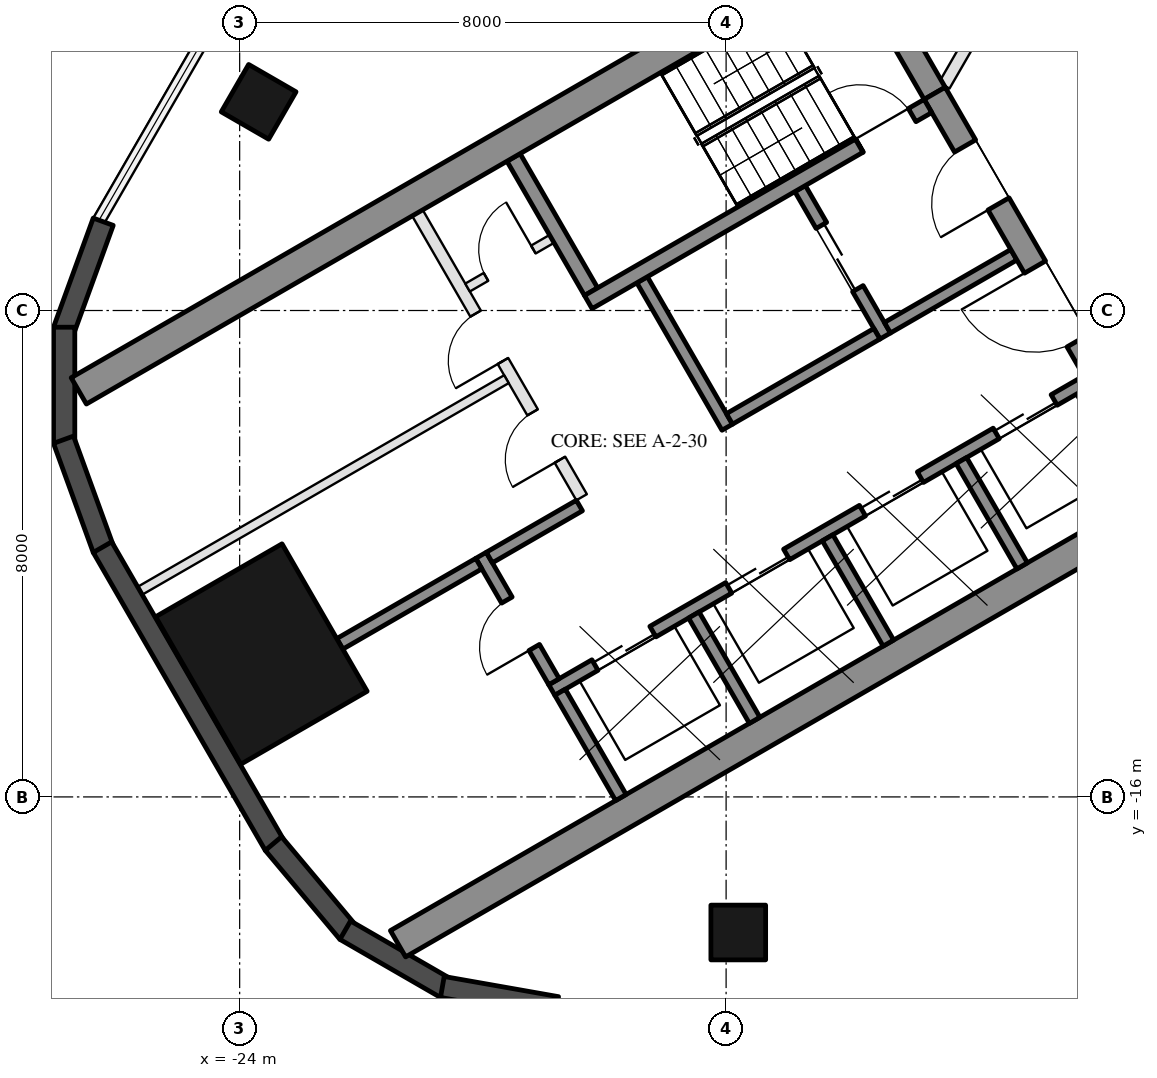
"""IFC4 building model, lengths in metres.
Left out: names, types, materials, properties, quantities, classifications, styles, units other than length and angle.
Written with IfcOpenShell. Run it as: python <this file> out.ifc"""

import sys

from ifc_helpers import new_model, si_unit, direction, frame, frame_2d, origin, origin_2d, place, context, subcontext, project, spatial, rectangle, hollow_rectangle, extrude, element, fill, save


model = new_model("IFC4")
c1 = context("Model", 3, precision=1e-05, world=origin(), true_north=direction((0.0, 1.0)))
c2 = subcontext(c1, "Body", "Model", "MODEL_VIEW")
j1 = project(units=[si_unit("LENGTHUNIT", "METRE"), si_unit("PLANEANGLEUNIT", "RADIAN")], contexts=[c1])
p1 = place(None, origin())
s1 = spatial("IfcSite", under=j1, at=p1, CompositionType="ELEMENT")
p2 = place(p1, origin())
s2 = spatial("IfcBuilding", under=s1, at=p2, CompositionType="ELEMENT")
p3 = place(p2, frame((0.0, 0.0, 131.6)))
s3 = spatial("IfcBuildingStorey", under=s2, at=p3, CompositionType="ELEMENT", Elevation=131.6)
for number, where, z_axis, x_axis in (
    (1, (-15.8, -18.23, 0.0), (0.0, 0.0, 1.0), (-1.0, 0.0, 0.0)),
    (2, (-23.688, -4.568, 0.0), (0.0, 0.0, 1.0), (0.5, 0.866, 0.0)),
):
    element("IfcColumn", number, at=place(p3, frame(where, z_axis=z_axis, x_axis=x_axis)), inside=s3, PredefinedType="COLUMN", context=c2, shape_type="SweptSolid", body=[
        extrude(hollow_rectangle(XDim=0.9, YDim=0.9, WallThickness=0.04, at=origin_2d()), origin(), (0.0, 0.0, 1.0), 6.0),
    ])
p4 = place(p3, frame((-23.643, -13.65, 0.0), z_axis=(0.0, 0.0, 1.0), x_axis=(-0.5, 0.866025403784, 0.0)))
e3 = element("IfcColumn", 3, at=p4, inside=s3, PredefinedType="COLUMN", context=c2, shape_type="SweptSolid", body=[
    extrude(hollow_rectangle(XDim=2.8, YDim=2.4, WallThickness=0.07, at=origin_2d()), origin(), (0.0, 0.0, 1.0), 6.0),
])
for number, where, z_axis, x_axis in (
    (4, (-26.244, -6.54, 0.0), (0.0, 0.0, 1.0), (-0.342, -0.94, 0.0)),
    (5, (-26.886, -8.275, 0.0), (0.0, 0.0, 1.0), (0.0, -1.0, 0.0)),
    (6, (-26.897, -10.125, 0.0), (0.0, 0.0, 1.0), (0.342, -0.94, 0.0)),
):
    element("IfcWall", number, at=place(p3, frame(where, z_axis=z_axis, x_axis=x_axis)), inside=s3, PredefinedType="SOLIDWALL", context=c2, shape_type="SweptSolid", body=[
        extrude(rectangle(XDim=1.91, YDim=0.35, at=frame_2d((0.955, 0.0))), origin(), (0.0, 0.0, 1.0), 5.7),
    ])
p5 = place(p3, frame((-26.256, -11.893, 0.0), z_axis=(0.0, 0.0, 1.0), x_axis=(0.499986410639, -0.866033249463, 0.0)))
e7 = element("IfcWall", 7, at=p5, inside=s3, PredefinedType="SOLIDWALL", context=c2, shape_type="SweptSolid", body=[
    extrude(rectangle(XDim=5.658, YDim=0.35, at=frame_2d((2.829, 0.0))), origin(), (0.0, 0.0, 1.0), 5.7),
])
for number, where, z_axis, x_axis in (
    (8, (-23.445, -16.768, 0.0), (0.0, 0.0, 1.0), (0.643, -0.766, 0.0)),
    (9, (-22.264, -18.192, 0.0), (0.0, 0.0, 1.0), (0.866, -0.5, 0.0)),
):
    element("IfcWall", number, at=place(p3, frame(where, z_axis=z_axis, x_axis=x_axis)), inside=s3, PredefinedType="SOLIDWALL", context=c2, shape_type="SweptSolid", body=[
        extrude(rectangle(XDim=1.91, YDim=0.35, at=frame_2d((0.955, 0.0))), origin(), (0.0, 0.0, 1.0), 5.7),
    ])
p6 = place(p3, frame((-20.667, -19.126, 0.0), z_axis=(0.0, 0.0, 1.0), x_axis=(0.984798995425, -0.173697837091, 0.0)))
e10 = element("IfcWall", 10, at=p6, inside=s3, PredefinedType="SOLIDWALL", context=c2, shape_type="SweptSolid", body=[
    extrude(rectangle(XDim=1.91, YDim=0.35, at=frame_2d((0.955, 0.0))), origin(), (0.0, 0.0, 1.0), 5.7),
])
p7 = place(p3, frame((-8.547, -10.997, 0.0), z_axis=(0.0, 0.0, 1.0), x_axis=(-0.866025009528, -0.500000682871, 0.0)))
e11 = element("IfcWall", 11, at=p7, inside=s3, PredefinedType="SHEAR", context=c2, shape_type="SweptSolid", body=[
    extrude(rectangle(XDim=14.837, YDim=0.5, at=frame_2d((7.418, 0.0))), origin(), (0.0, 0.0, 1.0), 5.7),
])
p8 = place(p3, frame((-19.496, -5.482, 0.0), z_axis=(0.0, 0.0, 1.0), x_axis=(0.499990435942, -0.866030925526, 0.0)))
e12 = element("IfcWall", 12, at=p8, inside=s3, PredefinedType="SHEAR", context=c2, shape_type="SweptSolid", body=[
    extrude(rectangle(XDim=2.55, YDim=0.25, at=frame_2d((1.275, 0.0))), origin(), (0.0, 0.0, 1.0), 5.7),
])
p9 = place(p3, frame((-17.381, -7.495, 0.0), z_axis=(0.0, 0.0, 1.0), x_axis=(0.500011755427, -0.866018616679, 0.0)))
e13 = element("IfcWall", 13, at=p9, inside=s3, PredefinedType="SHEAR", context=c2, shape_type="SweptSolid", body=[
    extrude(rectangle(XDim=2.8, YDim=0.2, at=frame_2d((1.4, 0.0))), origin(), (0.0, 0.0, 1.0), 5.7),
])
p10 = place(p3, frame((-14.783, -5.995, 0.0), z_axis=(0.0, 0.0, 1.0), x_axis=(0.49994636267, -0.866056369097, 0.0)))
e14 = element("IfcWall", 14, at=p10, inside=s3, PredefinedType="SHEAR", context=c2, shape_type="SweptSolid", body=[
    extrude(rectangle(XDim=2.8, YDim=0.2, at=frame_2d((1.4, 0.0))), origin(), (0.0, 0.0, 1.0), 5.7),
])
p11 = place(p10, frame((0.7, 0.0, 0.0)))
e15 = element("IfcOpeningElement", 15, at=p11, cuts=e14, PredefinedType="OPENING", context=c2, shape_type="SweptSolid", body=[
    extrude(rectangle(XDim=1.2, YDim=2.1, at=frame_2d((0.6, 1.05))), frame((0.0, 0.11, 0.0), z_axis=(0.0, -1.0, 0.0), x_axis=(1.0, 0.0, 0.0)), (0.0, 0.0, 1.0), 0.22),
])
p12 = place(p3, frame((-13.52, -8.383, 0.0), z_axis=(0.0, 0.0, 1.0), x_axis=(-0.866034573852, -0.49998411664, 0.0)))
e16 = element("IfcWall", 16, at=p12, inside=s3, PredefinedType="SHEAR", context=c2, shape_type="SweptSolid", body=[
    extrude(rectangle(XDim=2.8, YDim=0.2, at=frame_2d((1.4, 0.0))), origin(), (0.0, 0.0, 1.0), 5.7),
])
p13 = place(p3, frame((-11.268, -7.083, 0.0), z_axis=(0.0, 0.0, 1.0), x_axis=(-0.866050077142, -0.499957262057, 0.0)))
e17 = element("IfcWall", 17, at=p13, inside=s3, PredefinedType="SHEAR", context=c2, shape_type="SweptSolid", body=[
    extrude(rectangle(XDim=2.4, YDim=0.2, at=frame_2d((1.2, 0.0))), origin(), (0.0, 0.0, 1.0), 5.7),
])
p14 = place(p3, frame((-10.068, -9.162, 0.0), z_axis=(0.0, 0.0, 1.0), x_axis=(-0.866032725843, -0.499987317609, 0.0)))
e18 = element("IfcWall", 18, at=p14, inside=s3, PredefinedType="SHEAR", context=c2, shape_type="SweptSolid", body=[
    extrude(rectangle(XDim=10.16, YDim=0.2, at=frame_2d((5.08, 0.0))), origin(), (0.0, 0.0, 1.0), 5.7),
])
p15 = place(p14, frame((0.62, 0.0, 0.0)))
e19 = element("IfcOpeningElement", 19, at=p15, cuts=e18, PredefinedType="OPENING", context=c2, shape_type="SweptSolid", body=[
    extrude(rectangle(XDim=1.1, YDim=2.1, at=frame_2d((0.55, 1.05))), frame((0.0, 0.11, 0.0), z_axis=(0.0, -1.0, 0.0), x_axis=(1.0, 0.0, 0.0)), (0.0, 0.0, 1.0), 0.22),
])
p16 = place(p14, frame((3.16, 0.0, 0.0)))
e20 = element("IfcOpeningElement", 20, at=p16, cuts=e18, PredefinedType="OPENING", context=c2, shape_type="SweptSolid", body=[
    extrude(rectangle(XDim=1.1, YDim=2.1, at=frame_2d((0.55, 1.05))), frame((0.0, 0.11, 0.0), z_axis=(0.0, -1.0, 0.0), x_axis=(1.0, 0.0, 0.0)), (0.0, 0.0, 1.0), 0.22),
])
p17 = place(p14, frame((5.7, 0.0, 0.0)))
e21 = element("IfcOpeningElement", 21, at=p17, cuts=e18, PredefinedType="OPENING", context=c2, shape_type="SweptSolid", body=[
    extrude(rectangle(XDim=1.1, YDim=2.1, at=frame_2d((0.55, 1.05))), frame((0.0, 0.11, 0.0), z_axis=(0.0, -1.0, 0.0), x_axis=(1.0, 0.0, 0.0)), (0.0, 0.0, 1.0), 0.22),
])
p18 = place(p14, frame((8.24, 0.0, 0.0)))
e22 = element("IfcOpeningElement", 22, at=p18, cuts=e18, PredefinedType="OPENING", context=c2, shape_type="SweptSolid", body=[
    extrude(rectangle(XDim=1.1, YDim=2.1, at=frame_2d((0.55, 1.05))), frame((0.0, 0.11, 0.0), z_axis=(0.0, -1.0, 0.0), x_axis=(1.0, 0.0, 0.0)), (0.0, 0.0, 1.0), 0.22),
])
p19 = place(p3, frame((-20.031, -12.026, 0.0), z_axis=(0.0, 0.0, 1.0), x_axis=(0.500033551112, -0.866006032174, 0.0)))
e23 = element("IfcWall", 23, at=p19, inside=s3, PredefinedType="SHEAR", context=c2, shape_type="SweptSolid", body=[
    extrude(rectangle(XDim=2.4, YDim=0.2, at=frame_2d((1.2, 0.0))), origin(), (0.0, 0.0, 1.0), 5.7),
])
p20 = place(p19, frame((0.85, 0.0, 0.0)))
e24 = element("IfcOpeningElement", 24, at=p20, cuts=e23, PredefinedType="OPENING", context=c2, shape_type="SweptSolid", body=[
    extrude(rectangle(XDim=0.9, YDim=2.1, at=frame_2d((0.45, 1.05))), frame((0.0, 0.11, 0.0), z_axis=(0.0, -1.0, 0.0), x_axis=(1.0, 0.0, 0.0)), (0.0, 0.0, 1.0), 0.22),
])
p21 = place(p3, frame((-18.413, -11.208, 0.0), z_axis=(0.0, 0.0, 1.0), x_axis=(-0.866038183914, -0.499977863513, 0.0)))
e25 = element("IfcWall", 25, at=p21, inside=s3, PredefinedType="SHEAR", context=c2, shape_type="SweptSolid", body=[
    extrude(rectangle(XDim=1.71, YDim=0.2, at=frame_2d((0.855, 0.0))), origin(), (0.0, 0.0, 1.0), 5.7),
])
for number, where, z_axis, x_axis in (
    (26, (-12.131, -10.468, 0.0), (0.0, 0.0, 1.0), (0.5, -0.866, 0.0)),
    (27, (-14.331, -11.738, 0.0), (0.0, 0.0, 1.0), (0.5, -0.866, 0.0)),
    (28, (-16.531, -13.008, 0.0), (0.0, 0.0, 1.0), (0.5, -0.866, 0.0)),
    (29, (-18.73, -14.278, 0.0), (0.0, 0.0, 1.0), (0.5, -0.866, 0.0)),
):
    element("IfcWall", number, at=place(p3, frame(where, z_axis=z_axis, x_axis=x_axis)), inside=s3, PredefinedType="SHEAR", context=c2, shape_type="SweptSolid", body=[
        extrude(rectangle(XDim=2.0, YDim=0.2, at=frame_2d((1.0, 0.0))), origin(), (0.0, 0.0, 1.0), 5.7),
    ])
p22 = place(p3, frame((-20.067, -12.163, 0.0), z_axis=(0.0, 0.0, 1.0), x_axis=(-0.866060851709, -0.499938597367, 0.0)))
e30 = element("IfcWall", 30, at=p22, inside=s3, PredefinedType="SHEAR", context=c2, shape_type="SweptSolid", body=[
    extrude(rectangle(XDim=2.64, YDim=0.2, at=frame_2d((1.32, 0.0))), origin(), (0.0, 0.0, 1.0), 5.7),
])
p23 = place(p3, frame((-21.076, -6.395, 0.0), z_axis=(0.0, 0.0, 1.0), x_axis=(0.50001468107, -0.866016927499, 0.0)))
e31 = element("IfcWall", 31, at=p23, inside=s3, PredefinedType="PARTITIONING", context=c2, shape_type="SweptSolid", body=[
    extrude(rectangle(XDim=5.4, YDim=0.2, at=frame_2d((2.7, 0.0))), origin(), (0.0, 0.0, 1.0), 5.7),
])
p24 = place(p23, frame((1.913, 0.0, 0.0)))
e32 = element("IfcOpeningElement", 32, at=p24, cuts=e31, PredefinedType="OPENING", context=c2, shape_type="SweptSolid", body=[
    extrude(rectangle(XDim=0.9, YDim=2.1, at=frame_2d((0.45, 1.05))), frame((0.0, 0.11, 0.0), z_axis=(0.0, -1.0, 0.0), x_axis=(1.0, 0.0, 0.0)), (0.0, 0.0, 1.0), 0.22),
])
p25 = place(p23, frame((3.788, 0.0, 0.0)))
e33 = element("IfcOpeningElement", 33, at=p25, cuts=e31, PredefinedType="OPENING", context=c2, shape_type="SweptSolid", body=[
    extrude(rectangle(XDim=0.9, YDim=2.1, at=frame_2d((0.45, 1.05))), frame((0.0, 0.11, 0.0), z_axis=(0.0, -1.0, 0.0), x_axis=(1.0, 0.0, 0.0)), (0.0, 0.0, 1.0), 0.22),
])
p26 = place(p3, frame((-18.866, -6.822, 0.0), z_axis=(0.0, 0.0, 1.0), x_axis=(-0.866028054938, -0.499995408039, 0.0)))
e34 = element("IfcWall", 34, at=p26, inside=s3, PredefinedType="PARTITIONING", context=c2, shape_type="SweptSolid", body=[
    extrude(rectangle(XDim=1.6, YDim=0.15, at=frame_2d((0.8, 0.0))), origin(), (0.0, 0.0, 1.0), 5.7),
])
p27 = place(p26, frame((0.35, 0.0, 0.0)))
e35 = element("IfcOpeningElement", 35, at=p27, cuts=e34, PredefinedType="OPENING", context=c2, shape_type="SweptSolid", body=[
    extrude(rectangle(XDim=0.9, YDim=2.1, at=frame_2d((0.45, 1.05))), frame((0.0, 0.085, 0.0), z_axis=(0.0, -1.0, 0.0), x_axis=(1.0, 0.0, 0.0)), (0.0, 0.0, 1.0), 0.17),
])
p28 = place(p3, frame((-19.613, -9.13, 0.0), z_axis=(0.0, 0.0, 1.0), x_axis=(-0.866031734426, -0.499989034847, 0.0)))
e36 = element("IfcWall", 36, at=p28, inside=s3, PredefinedType="PARTITIONING", context=c2, shape_type="SweptSolid", body=[
    extrude(rectangle(XDim=6.95, YDim=0.15, at=frame_2d((3.475, 0.0))), origin(), (0.0, 0.0, 1.0), 5.7),
])
p29 = place(p3, frame((-15.274, -2.756, 0.0), z_axis=(0.0, 0.0, 1.0), x_axis=(-0.86602396135, -0.500002498361, 0.0)))
e37 = element("IfcWall", 37, at=p29, inside=s3, PredefinedType="SHEAR", context=c2, shape_type="SweptSolid", body=[
    extrude(rectangle(XDim=13.131, YDim=0.5, at=frame_2d((6.565, 0.0))), origin(), (0.0, 0.0, 1.0), 5.7),
])
p30 = place(p3, frame((-13.845, -2.22, 0.0), z_axis=(0.0, 0.0, 1.0), x_axis=(0.500062241894, -0.865989465428, 0.0)))
e38 = element("IfcWall", 38, at=p30, inside=s3, PredefinedType="SHEAR", context=c2, shape_type="SweptSolid", body=[
    extrude(rectangle(XDim=2.55, YDim=0.4, at=frame_2d((1.275, 0.0))), origin(), (0.0, 0.0, 1.0), 5.7),
])
p31 = place(p3, frame((-12.57, -4.428, 0.0), z_axis=(0.0, 0.0, 1.0), x_axis=(0.499984378957, -0.86603442241, 0.0)))
e39 = element("IfcWall", 39, at=p31, inside=s3, PredefinedType="SHEAR", context=c2, shape_type="SweptSolid", body=[
    extrude(rectangle(XDim=7.45, YDim=0.4, at=frame_2d((3.725, 0.0))), origin(), (0.0, 0.0, 1.0), 5.7),
])
p32 = place(p31, frame((1.0, 0.0, 0.0)))
e40 = element("IfcOpeningElement", 40, at=p32, cuts=e39, PredefinedType="OPENING", context=c2, shape_type="SweptSolid", body=[
    extrude(rectangle(XDim=1.1, YDim=2.1, at=frame_2d((0.55, 1.05))), frame((0.0, 0.21, 0.0), z_axis=(0.0, -1.0, 0.0), x_axis=(1.0, 0.0, 0.0)), (0.0, 0.0, 1.0), 0.42),
])
p33 = place(p31, frame((3.3, 0.0, 0.0)))
e41 = element("IfcOpeningElement", 41, at=p33, cuts=e39, PredefinedType="OPENING", context=c2, shape_type="SweptSolid", body=[
    extrude(rectangle(XDim=1.4, YDim=2.1, at=frame_2d((0.7, 1.05))), frame((0.0, 0.21, 0.0), z_axis=(0.0, -1.0, 0.0), x_axis=(1.0, 0.0, 0.0)), (0.0, 0.0, 1.0), 0.42),
])
p34 = place(p3, frame((-12.681, -4.636, 0.0), z_axis=(0.0, 0.0, 1.0), x_axis=(-0.86601437931, -0.500019094464, 0.0)))
e42 = element("IfcWall", 42, at=p34, inside=s3, PredefinedType="SHEAR", context=c2, shape_type="SweptSolid", body=[
    extrude(rectangle(XDim=1.306, YDim=0.25, at=frame_2d((0.653, 0.0))), origin(), (0.0, 0.0, 1.0), 5.7),
])
p35 = place(p34, frame((0.3, 0.0, 0.0)))
e43 = element("IfcOpeningElement", 43, at=p35, cuts=e42, PredefinedType="OPENING", context=c2, shape_type="SweptSolid", body=[
    extrude(rectangle(XDim=1.0, YDim=2.1, at=frame_2d((0.5, 1.05))), frame((0.0, 0.135, 0.0), z_axis=(0.0, -1.0, 0.0), x_axis=(1.0, 0.0, 0.0)), (0.0, 0.0, 1.0), 0.27),
])
p36 = place(p3, frame((-13.812, -5.29, 0.0), z_axis=(0.0, 0.0, 1.0), x_axis=(-0.866023561601, -0.500003190742, 0.0)))
e44 = element("IfcWall", 44, at=p36, inside=s3, PredefinedType="SHEAR", context=c2, shape_type="SweptSolid", body=[
    extrude(rectangle(XDim=5.144, YDim=0.25, at=frame_2d((2.572, 0.0))), origin(), (0.0, 0.0, 1.0), 5.7),
])
p37 = place(p3, frame((-2.482, 12.9, 0.0), z_axis=(0.0, 0.0, 1.0), x_axis=(-0.50000478328, -0.866022642139, 0.0)))
e45 = element("IfcWall", 45, at=p37, inside=s3, PredefinedType="PARTITIONING", context=c2, shape_type="SweptSolid", body=[
    extrude(rectangle(XDim=19.861, YDim=0.2, at=frame_2d((9.931, 0.0))), origin(), (0.0, 0.0, 1.0), 4.91),
])
p38 = place(p37, frame((2.643, 0.0, 0.0)))
e46 = element("IfcOpeningElement", 46, at=p38, cuts=e45, PredefinedType="OPENING", context=c2, shape_type="SweptSolid", body=[
    extrude(rectangle(XDim=1.5, YDim=2.1, at=frame_2d((0.75, 1.05))), frame((0.0, 0.11, 0.0), z_axis=(0.0, -1.0, 0.0), x_axis=(1.0, 0.0, 0.0)), (0.0, 0.0, 1.0), 0.22),
])
p39 = place(p37, frame((14.261, 0.0, 0.0)))
e47 = element("IfcOpeningElement", 47, at=p39, cuts=e45, PredefinedType="OPENING", context=c2, shape_type="SweptSolid", body=[
    extrude(rectangle(XDim=1.5, YDim=2.1, at=frame_2d((0.75, 1.05))), frame((0.0, 0.11, 0.0), z_axis=(0.0, -1.0, 0.0), x_axis=(1.0, 0.0, 0.0)), (0.0, 0.0, 1.0), 0.22),
])
p40 = place(p37, frame((17.394, 0.0, 0.0)))
e48 = element("IfcOpeningElement", 48, at=p40, cuts=e45, PredefinedType="OPENING", context=c2, shape_type="SweptSolid", body=[
    extrude(rectangle(XDim=1.5, YDim=2.1, at=frame_2d((0.75, 1.05))), frame((0.0, 0.11, 0.0), z_axis=(0.0, -1.0, 0.0), x_axis=(1.0, 0.0, 0.0)), (0.0, 0.0, 1.0), 0.22),
])
p41 = place(p37, frame((9.43, 0.0, 0.0)))
e49 = element("IfcOpeningElement", 49, at=p41, cuts=e45, PredefinedType="OPENING", context=c2, shape_type="SweptSolid", body=[
    extrude(rectangle(XDim=1.0, YDim=2.1, at=frame_2d((0.5, 1.05))), frame((0.0, 0.11, 0.0), z_axis=(0.0, -1.0, 0.0), x_axis=(1.0, 0.0, 0.0)), (0.0, 0.0, 1.0), 0.22),
])
p42 = place(p11, origin())
e50 = element("IfcDoor", 50, at=p42, inside=s3, OperationType="DOUBLE_DOOR_SLIDING", PredefinedType="DOOR", context=c2, shape_type="SweptSolid", body=[
    extrude(rectangle(XDim=1.2, YDim=2.1, at=frame_2d((0.6, 1.05))), frame((0.0, 0.025, 0.0), z_axis=(0.0, -1.0, 0.0), x_axis=(1.0, 0.0, 0.0)), (0.0, 0.0, 1.0), 0.05),
])
fill(e15, e50)
p43 = place(p27, frame((0.9, 0.0, 0.0), z_axis=(0.0, 0.0, 1.0), x_axis=(-1.0, 0.0, 0.0)))
e51 = element("IfcDoor", 51, at=p43, inside=s3, OperationType="SINGLE_SWING_RIGHT", PredefinedType="DOOR", context=c2, shape_type="SweptSolid", body=[
    extrude(rectangle(XDim=0.9, YDim=2.1, at=frame_2d((0.45, 1.05))), frame((0.0, 0.025, 0.0), z_axis=(0.0, -1.0, 0.0), x_axis=(1.0, 0.0, 0.0)), (0.0, 0.0, 1.0), 0.05),
])
fill(e35, e51)
p44 = place(p15, origin())
e52 = element("IfcDoor", 52, at=p44, inside=s3, OperationType="DOUBLE_DOOR_SLIDING", PredefinedType="DOOR", context=c2, shape_type="SweptSolid", body=[
    extrude(rectangle(XDim=1.1, YDim=2.1, at=frame_2d((0.55, 1.05))), frame((0.0, 0.025, 0.0), z_axis=(0.0, -1.0, 0.0), x_axis=(1.0, 0.0, 0.0)), (0.0, 0.0, 1.0), 0.05),
])
fill(e19, e52)
p45 = place(p16, origin())
e53 = element("IfcDoor", 53, at=p45, inside=s3, OperationType="DOUBLE_DOOR_SLIDING", PredefinedType="DOOR", context=c2, shape_type="SweptSolid", body=[
    extrude(rectangle(XDim=1.1, YDim=2.1, at=frame_2d((0.55, 1.05))), frame((0.0, 0.025, 0.0), z_axis=(0.0, -1.0, 0.0), x_axis=(1.0, 0.0, 0.0)), (0.0, 0.0, 1.0), 0.05),
])
fill(e20, e53)
p46 = place(p17, origin())
e54 = element("IfcDoor", 54, at=p46, inside=s3, OperationType="DOUBLE_DOOR_SLIDING", PredefinedType="DOOR", context=c2, shape_type="SweptSolid", body=[
    extrude(rectangle(XDim=1.1, YDim=2.1, at=frame_2d((0.55, 1.05))), frame((0.0, 0.025, 0.0), z_axis=(0.0, -1.0, 0.0), x_axis=(1.0, 0.0, 0.0)), (0.0, 0.0, 1.0), 0.05),
])
fill(e21, e54)
p47 = place(p18, origin())
e55 = element("IfcDoor", 55, at=p47, inside=s3, OperationType="DOUBLE_DOOR_SLIDING", PredefinedType="DOOR", context=c2, shape_type="SweptSolid", body=[
    extrude(rectangle(XDim=1.1, YDim=2.1, at=frame_2d((0.55, 1.05))), frame((0.0, 0.025, 0.0), z_axis=(0.0, -1.0, 0.0), x_axis=(1.0, 0.0, 0.0)), (0.0, 0.0, 1.0), 0.05),
])
fill(e22, e55)
p48 = place(p20, frame((0.9, 0.0, 0.0), z_axis=(0.0, 0.0, 1.0), x_axis=(-1.0, 0.0, 0.0)))
e56 = element("IfcDoor", 56, at=p48, inside=s3, OperationType="SINGLE_SWING_LEFT", PredefinedType="DOOR", context=c2, shape_type="SweptSolid", body=[
    extrude(rectangle(XDim=0.9, YDim=2.1, at=frame_2d((0.45, 1.05))), frame((0.0, 0.025, 0.0), z_axis=(0.0, -1.0, 0.0), x_axis=(1.0, 0.0, 0.0)), (0.0, 0.0, 1.0), 0.05),
])
fill(e24, e56)
p49 = place(p24, frame((0.9, 0.0, 0.0), z_axis=(0.0, 0.0, 1.0), x_axis=(-1.0, 0.0, 0.0)))
e57 = element("IfcDoor", 57, at=p49, inside=s3, OperationType="SINGLE_SWING_LEFT", PredefinedType="DOOR", context=c2, shape_type="SweptSolid", body=[
    extrude(rectangle(XDim=0.9, YDim=2.1, at=frame_2d((0.45, 1.05))), frame((0.0, 0.025, 0.0), z_axis=(0.0, -1.0, 0.0), x_axis=(1.0, 0.0, 0.0)), (0.0, 0.0, 1.0), 0.05),
])
fill(e32, e57)
p50 = place(p25, frame((0.9, 0.0, 0.0), z_axis=(0.0, 0.0, 1.0), x_axis=(-1.0, 0.0, 0.0)))
e58 = element("IfcDoor", 58, at=p50, inside=s3, OperationType="SINGLE_SWING_LEFT", PredefinedType="DOOR", context=c2, shape_type="SweptSolid", body=[
    extrude(rectangle(XDim=0.9, YDim=2.1, at=frame_2d((0.45, 1.05))), frame((0.0, 0.025, 0.0), z_axis=(0.0, -1.0, 0.0), x_axis=(1.0, 0.0, 0.0)), (0.0, 0.0, 1.0), 0.05),
])
fill(e33, e58)
p51 = place(p32, frame((1.1, 0.0, 0.0), z_axis=(0.0, 0.0, 1.0), x_axis=(-1.0, 0.0, 0.0)))
e59 = element("IfcDoor", 59, at=p51, inside=s3, OperationType="SINGLE_SWING_LEFT", PredefinedType="DOOR", context=c2, shape_type="SweptSolid", body=[
    extrude(rectangle(XDim=1.1, YDim=2.1, at=frame_2d((0.55, 1.05))), frame((0.0, 0.025, 0.0), z_axis=(0.0, -1.0, 0.0), x_axis=(1.0, 0.0, 0.0)), (0.0, 0.0, 1.0), 0.05),
])
fill(e40, e59)
p52 = place(p33, frame((1.4, 0.0, 0.0), z_axis=(0.0, 0.0, 1.0), x_axis=(-1.0, 0.0, 0.0)))
e60 = element("IfcDoor", 60, at=p52, inside=s3, OperationType="DOUBLE_DOOR_SINGLE_SWING", PredefinedType="DOOR", context=c2, shape_type="SweptSolid", body=[
    extrude(rectangle(XDim=1.4, YDim=2.1, at=frame_2d((0.7, 1.05))), frame((0.0, 0.025, 0.0), z_axis=(0.0, -1.0, 0.0), x_axis=(1.0, 0.0, 0.0)), (0.0, 0.0, 1.0), 0.05),
])
fill(e41, e60)
p53 = place(p35, frame((1.0, 0.0, 0.0), z_axis=(0.0, 0.0, 1.0), x_axis=(-1.0, 0.0, 0.0)))
e61 = element("IfcDoor", 61, at=p53, inside=s3, OperationType="SINGLE_SWING_LEFT", PredefinedType="DOOR", context=c2, shape_type="SweptSolid", body=[
    extrude(rectangle(XDim=1.0, YDim=2.1, at=frame_2d((0.5, 1.05))), frame((0.0, 0.025, 0.0), z_axis=(0.0, -1.0, 0.0), x_axis=(1.0, 0.0, 0.0)), (0.0, 0.0, 1.0), 0.05),
])
fill(e43, e61)
save(model, sys.argv[1])
